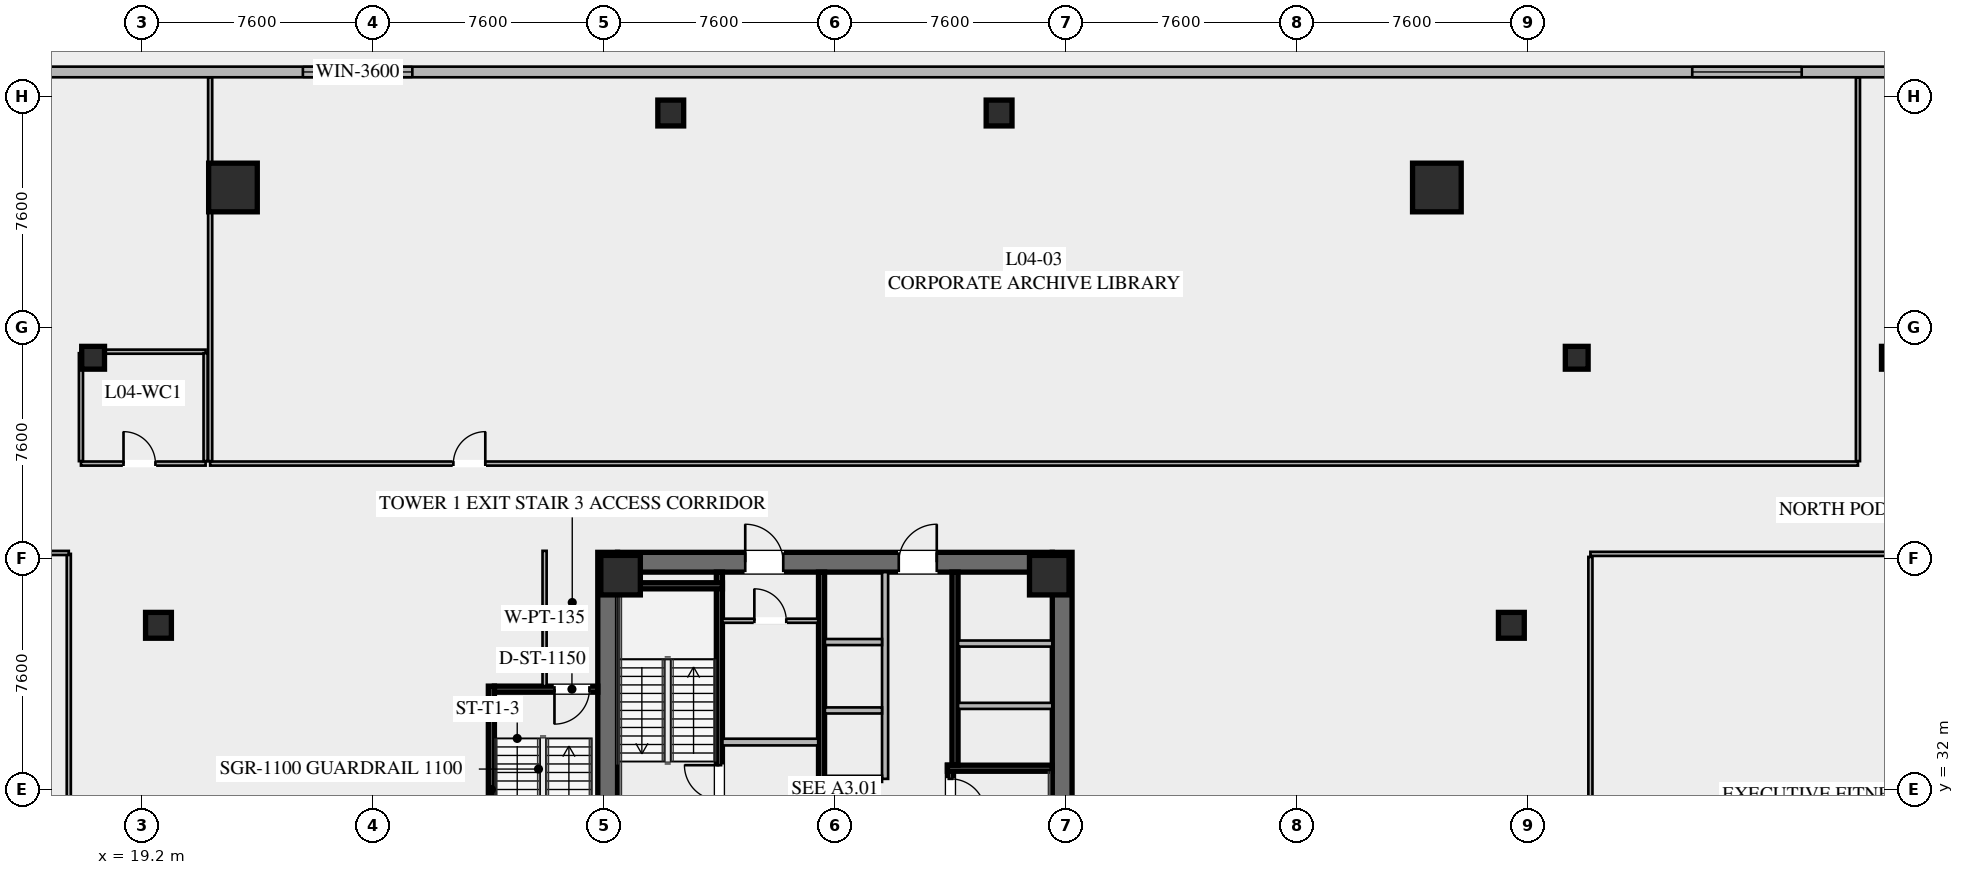
"""IFC4 building model, lengths in metres.
Left out: names, types, materials, properties, quantities, classifications, styles, units other than length and angle.
Written with IfcOpenShell. Run it as: python <this file> out.ifc"""

import sys

from ifc_helpers import new_model, si_unit, direction, frame, frame_2d, origin, origin_2d, place, context, subcontext, project, spatial, rectangle, hollow_rectangle, extrude, element, fill, save


model = new_model("IFC4")
c1 = context("Model", 3, precision=1e-05, world=origin(), true_north=direction((0.0, 1.0)))
c2 = subcontext(c1, "Body", "Model", "MODEL_VIEW")
j1 = project(units=[si_unit("LENGTHUNIT", "METRE"), si_unit("PLANEANGLEUNIT", "RADIAN")], contexts=[c1])
p1 = place(None, origin())
s1 = spatial("IfcSite", under=j1, at=p1, CompositionType="ELEMENT")
p2 = place(p1, origin())
s2 = spatial("IfcBuilding", under=s1, at=p2, CompositionType="ELEMENT")
p3 = place(p2, frame((0.0, 0.0, 19.8)))
s3 = spatial("IfcBuildingStorey", under=s2, at=p3, CompositionType="ELEMENT", Elevation=19.8)
for number, where, z_axis, x_axis in (
    (1, (34.525, 24.2, 0.0), (0.0, 0.0, 1.0), (0.0, 1.0, 0.0)),
    (2, (49.475, 39.8, 0.0), (0.0, 0.0, 1.0), (0.0, -1.0, 0.0)),
):
    element("IfcWall", number, at=place(p3, frame(where, z_axis=z_axis, x_axis=x_axis)), inside=s3, PredefinedType="SHEAR", context=c2, shape_type="SweptSolid", body=[
        extrude(rectangle(XDim=15.6, YDim=0.65, at=frame_2d((7.8, 0.0))), origin(), (0.0, 0.0, 1.0), 4.8),
    ])
p4 = place(p3, frame((34.85, 39.475, 0.0), z_axis=(0.0, 0.0, 1.0), x_axis=(1.0, 0.0, 0.0)))
e3 = element("IfcWall", 3, at=p4, inside=s3, PredefinedType="SHEAR", context=c2, shape_type="SweptSolid", body=[
    extrude(rectangle(XDim=14.3, YDim=0.65, at=frame_2d((7.15, 0.0))), origin(), (0.0, 0.0, 1.0), 4.8),
])
p5 = place(p4, frame((4.2, 0.0, 0.0)))
e4 = element("IfcOpeningElement", 4, at=p5, cuts=e3, PredefinedType="OPENING", context=c2, shape_type="SweptSolid", body=[
    extrude(rectangle(XDim=1.25, YDim=2.25, at=frame_2d((0.625, 1.125))), frame((0.0, 0.335, 0.0), z_axis=(0.0, -1.0, 0.0), x_axis=(1.0, 0.0, 0.0)), (0.0, 0.0, 1.0), 0.67),
])
p6 = place(p4, frame((9.25, 0.0, 0.0)))
e5 = element("IfcOpeningElement", 5, at=p6, cuts=e3, PredefinedType="OPENING", context=c2, shape_type="SweptSolid", body=[
    extrude(rectangle(XDim=1.25, YDim=2.25, at=frame_2d((0.625, 1.125))), frame((0.0, 0.335, 0.0), z_axis=(0.0, -1.0, 0.0), x_axis=(1.0, 0.0, 0.0)), (0.0, 0.0, 1.0), 0.67),
])
for number, where, z_axis, x_axis in (
    (6, (49.05, 39.05, 0.0), (0.0, 0.0, 1.0), (1.0, 0.0, 0.0)),
    (7, (34.95, 39.05, 0.0), (0.0, 0.0, 1.0), (1.0, 0.0, 0.0)),
):
    element("IfcColumn", number, at=place(p3, frame(where, z_axis=z_axis, x_axis=x_axis)), inside=s3, PredefinedType="COLUMN", context=c2, shape_type="SweptSolid", body=[
        extrude(hollow_rectangle(XDim=1.3, YDim=1.3, WallThickness=0.05, at=origin_2d()), origin(), (0.0, 0.0, 1.0), 4.6),
    ])
for number, where, z_axis, x_axis in (
    (8, (61.8, 51.8, 0.0), (0.0, 0.0, 1.0), (1.0, 0.0, 0.0)),
    (9, (22.2, 51.8, 0.0), (0.0, 0.0, 1.0), (1.0, 0.0, 0.0)),
):
    element("IfcColumn", number, at=place(p3, frame(where, z_axis=z_axis, x_axis=x_axis)), inside=s3, PredefinedType="COLUMN", context=c2, shape_type="SweptSolid", body=[
        extrude(hollow_rectangle(XDim=1.6, YDim=1.6, WallThickness=0.06, at=origin_2d()), origin(), (0.0, 0.0, 1.0), 4.6),
    ])
for number, where, z_axis, x_axis in (
    (10, (64.25, 37.4, 0.0), (0.0, 0.0, 1.0), (1.0, 0.0, 0.0)),
    (11, (47.4, 54.25, 0.0), (0.0, 0.0, 1.0), (1.0, 0.0, 0.0)),
    (12, (36.6, 54.25, 0.0), (0.0, 0.0, 1.0), (1.0, 0.0, 0.0)),
    (13, (19.75, 37.4, 0.0), (0.0, 0.0, 1.0), (1.0, 0.0, 0.0)),
):
    element("IfcColumn", number, at=place(p3, frame(where, z_axis=z_axis, x_axis=x_axis)), inside=s3, PredefinedType="COLUMN", context=c2, shape_type="SweptSolid", body=[
        extrude(hollow_rectangle(XDim=0.85, YDim=0.85, WallThickness=0.035, at=origin_2d()), origin(), (0.0, 0.0, 1.0), 4.6),
    ])
for number, where, z_axis, x_axis in (
    (14, (17.6, 46.2, 0.0), (0.0, 0.0, 1.0), (1.0, 0.0, 0.0)),
    (15, (66.4, 46.2, 0.0), (0.0, 0.0, 1.0), (1.0, 0.0, 0.0)),
    (16, (76.8, 46.2, 0.0), (0.0, 0.0, 1.0), (1.0, 0.0, 0.0)),
):
    element("IfcColumn", number, at=place(p3, frame(where, z_axis=z_axis, x_axis=x_axis)), inside=s3, PredefinedType="COLUMN", context=c2, shape_type="SweptSolid", body=[
        extrude(rectangle(XDim=0.75, YDim=0.75, at=origin_2d()), origin(), (0.0, 0.0, 1.0), 4.6),
    ])
p7 = place(p3, frame((11.35, 55.6, 0.0), z_axis=(0.0, 0.0, 1.0), x_axis=(1.0, 0.0, 0.0)))
e17 = element("IfcWall", 17, at=p7, inside=s3, PredefinedType="SOLIDWALL", context=c2, shape_type="SweptSolid", body=[
    extrude(rectangle(XDim=132.475, YDim=0.35, at=frame_2d((66.237, 0.0))), origin(), (0.0, 0.0, 1.0), 4.6),
])
p8 = place(p7, frame((13.15, 0.0, 0.95)))
e18 = element("IfcOpeningElement", 18, at=p8, cuts=e17, PredefinedType="OPENING", context=c2, shape_type="SweptSolid", body=[
    extrude(rectangle(XDim=3.6, YDim=1.8, at=frame_2d((1.8, 0.9))), frame((0.0, 0.185, 0.0), z_axis=(0.0, -1.0, 0.0), x_axis=(1.0, 0.0, 0.0)), (0.0, 0.0, 1.0), 0.37),
])
p9 = place(p7, frame((58.85, 0.0, 0.95)))
e19 = element("IfcOpeningElement", 19, at=p9, cuts=e17, PredefinedType="OPENING", context=c2, shape_type="SweptSolid", body=[
    extrude(rectangle(XDim=3.6, YDim=1.8, at=frame_2d((1.8, 0.9))), frame((0.0, 0.185, 0.0), z_axis=(0.0, -1.0, 0.0), x_axis=(1.0, 0.0, 0.0)), (0.0, 0.0, 1.0), 0.37),
])
p10 = place(p7, frame((68.45, 0.0, 0.95)))
e20 = element("IfcOpeningElement", 20, at=p10, cuts=e17, PredefinedType="OPENING", context=c2, shape_type="SweptSolid", body=[
    extrude(rectangle(XDim=3.6, YDim=1.8, at=frame_2d((1.8, 0.9))), frame((0.0, 0.185, 0.0), z_axis=(0.0, -1.0, 0.0), x_axis=(1.0, 0.0, 0.0)), (0.0, 0.0, 1.0), 0.37),
])
p11 = place(p3, frame((38.2, 31.2, 0.0), z_axis=(0.0, 0.0, 1.0), x_axis=(0.0, 1.0, 0.0)))
e21 = element("IfcWall", 21, at=p11, inside=s3, PredefinedType="SHEAR", context=c2, shape_type="SweptSolid", body=[
    extrude(rectangle(XDim=7.95, YDim=0.2, at=frame_2d((3.975, 0.0))), origin(), (0.0, 0.0, 1.0), 4.6),
])
p12 = place(p11, frame((0.45, 0.0, 0.0)))
e22 = element("IfcOpeningElement", 22, at=p12, cuts=e21, PredefinedType="OPENING", context=c2, shape_type="SweptSolid", body=[
    extrude(rectangle(XDim=1.15, YDim=2.2, at=frame_2d((0.575, 1.1))), frame((0.0, 0.11, 0.0), z_axis=(0.0, -1.0, 0.0), x_axis=(1.0, 0.0, 0.0)), (0.0, 0.0, 1.0), 0.22),
])
p13 = place(p3, frame((34.85, 38.7, 0.0), z_axis=(0.0, 0.0, 1.0), x_axis=(1.0, 0.0, 0.0)))
e23 = element("IfcWall", 23, at=p13, inside=s3, PredefinedType="SHEAR", context=c2, shape_type="SweptSolid", body=[
    extrude(rectangle(XDim=3.45, YDim=0.2, at=frame_2d((1.725, 0.0))), origin(), (0.0, 0.0, 1.0), 4.6),
])
p14 = place(p3, frame((45.8, 32.8, 0.0), z_axis=(0.0, 0.0, 1.0), x_axis=(0.0, -1.0, 0.0)))
e24 = element("IfcWall", 24, at=p14, inside=s3, PredefinedType="SHEAR", context=c2, shape_type="SweptSolid", body=[
    extrude(rectangle(XDim=7.95, YDim=0.2, at=frame_2d((3.975, 0.0))), origin(), (0.0, 0.0, 1.0), 4.6),
])
p15 = place(p14, frame((0.45, 0.0, 0.0)))
e25 = element("IfcOpeningElement", 25, at=p15, cuts=e24, PredefinedType="OPENING", context=c2, shape_type="SweptSolid", body=[
    extrude(rectangle(XDim=1.15, YDim=2.2, at=frame_2d((0.575, 1.1))), frame((0.0, 0.11, 0.0), z_axis=(0.0, -1.0, 0.0), x_axis=(1.0, 0.0, 0.0)), (0.0, 0.0, 1.0), 0.22),
])
p16 = place(p3, frame((45.7, 32.7, 0.0), z_axis=(0.0, 0.0, 1.0), x_axis=(1.0, 0.0, 0.0)))
e26 = element("IfcWall", 26, at=p16, inside=s3, PredefinedType="SHEAR", context=c2, shape_type="SweptSolid", body=[
    extrude(rectangle(XDim=3.45, YDim=0.2, at=frame_2d((1.725, 0.0))), origin(), (0.0, 0.0, 1.0), 4.6),
])
p17 = place(p3, frame((41.56, 24.85, 0.0), z_axis=(0.0, 0.0, 1.0), x_axis=(0.0, 1.0, 0.0)))
e27 = element("IfcWall", 27, at=p17, inside=s3, PredefinedType="SHEAR", context=c2, shape_type="SweptSolid", body=[
    extrude(rectangle(XDim=14.3, YDim=0.2, at=frame_2d((7.15, 0.0))), origin(), (0.0, 0.0, 1.0), 4.6),
])
p18 = place(p3, frame((38.3, 33.56, 0.0), z_axis=(0.0, 0.0, 1.0), x_axis=(1.0, 0.0, 0.0)))
e28 = element("IfcWall", 28, at=p18, inside=s3, PredefinedType="SOLIDWALL", context=c2, shape_type="SweptSolid", body=[
    extrude(rectangle(XDim=3.15, YDim=0.22, at=frame_2d((1.575, 0.0))), origin(), (0.0, 0.0, 1.0), 3.643),
])
p19 = place(p3, frame((45.95, 39.15, 0.0), z_axis=(0.0, 0.0, 1.0), x_axis=(0.0, -1.0, 0.0)))
e29 = element("IfcWall", 29, at=p19, inside=s3, PredefinedType="SHEAR", context=c2, shape_type="SweptSolid", body=[
    extrude(rectangle(XDim=6.35, YDim=0.2, at=frame_2d((3.175, 0.0))), origin(), (0.0, 0.0, 1.0), 4.6),
])
for number, where, z_axis, x_axis in (
    (30, (46.05, 34.75, 0.0), (0.0, 0.0, 1.0), (1.0, 0.0, 0.0)),
    (31, (46.05, 36.8, 0.0), (0.0, 0.0, 1.0), (1.0, 0.0, 0.0)),
):
    element("IfcWall", number, at=place(p3, frame(where, z_axis=z_axis, x_axis=x_axis)), inside=s3, PredefinedType="SOLIDWALL", context=c2, shape_type="SweptSolid", body=[
        extrude(rectangle(XDim=3.1, YDim=0.2, at=frame_2d((1.55, 0.0))), origin(), (0.0, 0.0, 1.0), 4.6),
    ])
p20 = place(p3, frame((38.3, 37.55, 0.0), z_axis=(0.0, 0.0, 1.0), x_axis=(1.0, 0.0, 0.0)))
e32 = element("IfcWall", 32, at=p20, inside=s3, PredefinedType="PARTITIONING", context=c2, shape_type="SweptSolid", body=[
    extrude(rectangle(XDim=3.15, YDim=0.135, at=frame_2d((1.575, 0.0))), origin(), (0.0, 0.0, 1.0), 3.643),
])
p21 = place(p20, frame((1.05, 0.0, 0.0)))
e33 = element("IfcOpeningElement", 33, at=p21, cuts=e32, PredefinedType="OPENING", context=c2, shape_type="SweptSolid", body=[
    extrude(rectangle(XDim=1.05, YDim=2.2, at=frame_2d((0.525, 1.1))), frame((0.0, 0.077, 0.0), z_axis=(0.0, -1.0, 0.0), x_axis=(1.0, 0.0, 0.0)), (0.0, 0.0, 1.0), 0.155),
])
p22 = place(p3, frame((43.65, 32.35, 0.0), z_axis=(0.0, 0.0, 1.0), x_axis=(0.0, 1.0, 0.0)))
e34 = element("IfcWall", 34, at=p22, inside=s3, PredefinedType="SOLIDWALL", context=c2, shape_type="SweptSolid", body=[
    extrude(rectangle(XDim=6.8, YDim=0.2, at=frame_2d((3.4, 0.0))), origin(), (0.0, 0.0, 1.0), 4.6),
])
for number, where, z_axis, x_axis in (
    (35, (41.67, 32.35, 0.0), (0.0, 0.0, 1.0), (1.0, 0.0, 0.0)),
    (36, (41.67, 34.6, 0.0), (0.0, 0.0, 1.0), (1.0, 0.0, 0.0)),
    (37, (41.67, 36.85, 0.0), (0.0, 0.0, 1.0), (1.0, 0.0, 0.0)),
):
    element("IfcWall", number, at=place(p3, frame(where, z_axis=z_axis, x_axis=x_axis)), inside=s3, PredefinedType="SOLIDWALL", context=c2, shape_type="SweptSolid", body=[
        extrude(rectangle(XDim=1.88, YDim=0.2, at=frame_2d((0.94, 0.0))), origin(), (0.0, 0.0, 1.0), 4.6),
    ])
p23 = place(p3, frame((30.7, 28.6, 0.0), z_axis=(0.0, 0.0, 1.0), x_axis=(0.0, 1.0, 0.0)))
e38 = element("IfcWall", 38, at=p23, inside=s3, PredefinedType="SHEAR", context=c2, shape_type="SweptSolid", body=[
    extrude(rectangle(XDim=6.8, YDim=0.2, at=frame_2d((3.4, 0.0))), origin(), (0.0, 0.0, 1.0), 4.6),
])
p24 = place(p3, frame((34.2, 35.3, 0.0), z_axis=(0.0, 0.0, 1.0), x_axis=(-1.0, 0.0, 0.0)))
e39 = element("IfcWall", 39, at=p24, inside=s3, PredefinedType="SHEAR", context=c2, shape_type="SweptSolid", body=[
    extrude(rectangle(XDim=3.4, YDim=0.2, at=frame_2d((1.7, 0.0))), origin(), (0.0, 0.0, 1.0), 4.6),
])
p25 = place(p24, frame((0.275, 0.0, 0.0)))
e40 = element("IfcOpeningElement", 40, at=p25, cuts=e39, PredefinedType="OPENING", context=c2, shape_type="SweptSolid", body=[
    extrude(rectangle(XDim=1.15, YDim=2.2, at=frame_2d((0.575, 1.1))), frame((0.0, 0.11, 0.0), z_axis=(0.0, -1.0, 0.0), x_axis=(1.0, 0.0, 0.0)), (0.0, 0.0, 1.0), 0.22),
])
p26 = place(p3, frame((32.45, 35.4, 0.0), z_axis=(0.0, 0.0, 1.0), x_axis=(0.0, 1.0, 0.0)))
e41 = element("IfcWall", 41, at=p26, inside=s3, PredefinedType="PARTITIONING", context=c2, shape_type="SweptSolid", body=[
    extrude(rectangle(XDim=4.45, YDim=0.135, at=frame_2d((2.225, 0.0))), origin(), (0.0, 0.0, 1.0), 3.643),
])
p27 = place(p3, frame((16.8, 24.35, 0.0), z_axis=(0.0, 0.0, 1.0), x_axis=(0.0, 1.0, 0.0)))
e42 = element("IfcWall", 42, at=p27, inside=s3, PredefinedType="PARTITIONING", context=c2, shape_type="SweptSolid", body=[
    extrude(rectangle(XDim=15.4, YDim=0.135, at=frame_2d((7.7, 0.0))), origin(), (0.0, 0.0, 1.0), 3.643),
])
p28 = place(p3, frame((11.35, 39.78, 0.0), z_axis=(0.0, 0.0, 1.0), x_axis=(1.0, 0.0, 0.0)))
e43 = element("IfcWall", 43, at=p28, inside=s3, PredefinedType="PARTITIONING", context=c2, shape_type="SweptSolid", body=[
    extrude(rectangle(XDim=5.45, YDim=0.135, at=frame_2d((2.725, 0.0))), origin(), (0.0, 0.0, 1.0), 3.643),
])
p29 = place(p3, frame((66.85, 24.35, 0.0), z_axis=(0.0, 0.0, 1.0), x_axis=(0.0, 1.0, 0.0)))
e44 = element("IfcWall", 44, at=p29, inside=s3, PredefinedType="PARTITIONING", context=c2, shape_type="SweptSolid", body=[
    extrude(rectangle(XDim=15.3, YDim=0.135, at=frame_2d((7.65, 0.0))), origin(), (0.0, 0.0, 1.0), 3.643),
])
p30 = place(p3, frame((66.85, 39.75, 0.0), z_axis=(0.0, 0.0, 1.0), x_axis=(1.0, 0.0, 0.0)))
e45 = element("IfcWall", 45, at=p30, inside=s3, PredefinedType="PARTITIONING", context=c2, shape_type="SweptSolid", body=[
    extrude(rectangle(XDim=19.9, YDim=0.135, at=frame_2d((9.95, 0.0))), origin(), (0.0, 0.0, 1.0), 3.643),
])
p31 = place(p3, frame((21.45, 42.72, 0.0), z_axis=(0.0, 0.0, 1.0), x_axis=(1.0, 0.0, 0.0)))
e46 = element("IfcWall", 46, at=p31, inside=s3, PredefinedType="PARTITIONING", context=c2, shape_type="SweptSolid", body=[
    extrude(rectangle(XDim=54.2, YDim=0.135, at=frame_2d((27.1, 0.0))), origin(), (0.0, 0.0, 1.0), 3.643),
])
p32 = place(p31, frame((8.0, 0.0, 0.0)))
e47 = element("IfcOpeningElement", 47, at=p32, cuts=e46, PredefinedType="OPENING", context=c2, shape_type="SweptSolid", body=[
    extrude(rectangle(XDim=1.05, YDim=2.2, at=frame_2d((0.525, 1.1))), frame((0.0, 0.077, 0.0), z_axis=(0.0, -1.0, 0.0), x_axis=(1.0, 0.0, 0.0)), (0.0, 0.0, 1.0), 0.155),
])
for number, where, z_axis, x_axis in (
    (48, (21.45, 42.8, 0.0), (0.0, 0.0, 1.0), (0.0, 1.0, 0.0)),
    (49, (75.65, 42.8, 0.0), (0.0, 0.0, 1.0), (0.0, 1.0, 0.0)),
):
    element("IfcWall", number, at=place(p3, frame(where, z_axis=z_axis, x_axis=x_axis)), inside=s3, PredefinedType="PARTITIONING", context=c2, shape_type="SweptSolid", body=[
        extrude(rectangle(XDim=12.62, YDim=0.135, at=frame_2d((6.31, 0.0))), origin(), (0.0, 0.0, 1.0), 3.643),
    ])
p33 = place(p3, frame((17.2, 42.72, 0.0), z_axis=(0.0, 0.0, 1.0), x_axis=(1.0, 0.0, 0.0)))
e50 = element("IfcWall", 50, at=p33, inside=s3, PredefinedType="PARTITIONING", context=c2, shape_type="SweptSolid", body=[
    extrude(rectangle(XDim=4.1, YDim=0.135, at=frame_2d((2.05, 0.0))), origin(), (0.0, 0.0, 1.0), 3.643),
])
p34 = place(p33, frame((1.4, 0.0, 0.0)))
e51 = element("IfcOpeningElement", 51, at=p34, cuts=e50, PredefinedType="OPENING", context=c2, shape_type="SweptSolid", body=[
    extrude(rectangle(XDim=1.05, YDim=2.2, at=frame_2d((0.525, 1.1))), frame((0.0, 0.077, 0.0), z_axis=(0.0, -1.0, 0.0), x_axis=(1.0, 0.0, 0.0)), (0.0, 0.0, 1.0), 0.155),
])
p35 = place(p3, frame((17.2, 46.4, 0.0), z_axis=(0.0, 0.0, 1.0), x_axis=(1.0, 0.0, 0.0)))
e52 = element("IfcWall", 52, at=p35, inside=s3, PredefinedType="PARTITIONING", context=c2, shape_type="SweptSolid", body=[
    extrude(rectangle(XDim=4.1, YDim=0.135, at=frame_2d((2.05, 0.0))), origin(), (0.0, 0.0, 1.0), 3.643),
])
for number, where, z_axis, x_axis in (
    (53, (17.2, 42.8, 0.0), (0.0, 0.0, 1.0), (0.0, 1.0, 0.0)),
    (54, (21.3, 42.8, 0.0), (0.0, 0.0, 1.0), (0.0, 1.0, 0.0)),
):
    element("IfcWall", number, at=place(p3, frame(where, z_axis=z_axis, x_axis=x_axis)), inside=s3, PredefinedType="PARTITIONING", context=c2, shape_type="SweptSolid", body=[
        extrude(rectangle(XDim=3.55, YDim=0.135, at=frame_2d((1.775, 0.0))), origin(), (0.0, 0.0, 1.0), 3.643),
    ])
p36 = place(p8, origin())
e55 = element("IfcWindow", 55, at=p36, inside=s3, PartitioningType="SINGLE_PANEL", PredefinedType="WINDOW", context=c2, shape_type="SweptSolid", body=[
    extrude(rectangle(XDim=3.6, YDim=1.8, at=frame_2d((1.8, 0.9))), frame((0.0, 0.03, 0.0), z_axis=(0.0, -1.0, 0.0), x_axis=(1.0, 0.0, 0.0)), (0.0, 0.0, 1.0), 0.06),
])
fill(e18, e55)
p37 = place(p9, origin())
e56 = element("IfcWindow", 56, at=p37, inside=s3, PartitioningType="SINGLE_PANEL", PredefinedType="WINDOW", context=c2, shape_type="SweptSolid", body=[
    extrude(rectangle(XDim=3.6, YDim=1.8, at=frame_2d((1.8, 0.9))), frame((0.0, 0.03, 0.0), z_axis=(0.0, -1.0, 0.0), x_axis=(1.0, 0.0, 0.0)), (0.0, 0.0, 1.0), 0.06),
])
fill(e19, e56)
p38 = place(p5, origin())
e57 = element("IfcDoor", 57, at=p38, inside=s3, OperationType="SINGLE_SWING_LEFT", PredefinedType="DOOR", context=c2, shape_type="SweptSolid", body=[
    extrude(rectangle(XDim=1.25, YDim=2.25, at=frame_2d((0.625, 1.125))), frame((0.0, 0.025, 0.0), z_axis=(0.0, -1.0, 0.0), x_axis=(1.0, 0.0, 0.0)), (0.0, 0.0, 1.0), 0.05),
])
fill(e4, e57)
p39 = place(p6, origin())
e58 = element("IfcDoor", 58, at=p39, inside=s3, OperationType="SINGLE_SWING_RIGHT", PredefinedType="DOOR", context=c2, shape_type="SweptSolid", body=[
    extrude(rectangle(XDim=1.25, YDim=2.25, at=frame_2d((0.625, 1.125))), frame((0.0, 0.025, 0.0), z_axis=(0.0, -1.0, 0.0), x_axis=(1.0, 0.0, 0.0)), (0.0, 0.0, 1.0), 0.05),
])
fill(e5, e58)
p40 = place(p12, origin())
e59 = element("IfcDoor", 59, at=p40, inside=s3, OperationType="SINGLE_SWING_RIGHT", PredefinedType="DOOR", context=c2, shape_type="SweptSolid", body=[
    extrude(rectangle(XDim=1.15, YDim=2.2, at=frame_2d((0.575, 1.1))), frame((0.0, 0.025, 0.0), z_axis=(0.0, -1.0, 0.0), x_axis=(1.0, 0.0, 0.0)), (0.0, 0.0, 1.0), 0.05),
])
fill(e22, e59)
p41 = place(p15, origin())
e60 = element("IfcDoor", 60, at=p41, inside=s3, OperationType="SINGLE_SWING_RIGHT", PredefinedType="DOOR", context=c2, shape_type="SweptSolid", body=[
    extrude(rectangle(XDim=1.15, YDim=2.2, at=frame_2d((0.575, 1.1))), frame((0.0, 0.025, 0.0), z_axis=(0.0, -1.0, 0.0), x_axis=(1.0, 0.0, 0.0)), (0.0, 0.0, 1.0), 0.05),
])
fill(e25, e60)
p42 = place(p21, origin())
e61 = element("IfcDoor", 61, at=p42, inside=s3, OperationType="SINGLE_SWING_LEFT", PredefinedType="DOOR", context=c2, shape_type="SweptSolid", body=[
    extrude(rectangle(XDim=1.05, YDim=2.2, at=frame_2d((0.525, 1.1))), frame((0.0, 0.025, 0.0), z_axis=(0.0, -1.0, 0.0), x_axis=(1.0, 0.0, 0.0)), (0.0, 0.0, 1.0), 0.05),
])
fill(e33, e61)
p43 = place(p25, origin())
e62 = element("IfcDoor", 62, at=p43, inside=s3, OperationType="SINGLE_SWING_RIGHT", PredefinedType="DOOR", context=c2, shape_type="SweptSolid", body=[
    extrude(rectangle(XDim=1.15, YDim=2.2, at=frame_2d((0.575, 1.1))), frame((0.0, 0.025, 0.0), z_axis=(0.0, -1.0, 0.0), x_axis=(1.0, 0.0, 0.0)), (0.0, 0.0, 1.0), 0.05),
])
fill(e40, e62)
p44 = place(p32, origin())
e63 = element("IfcDoor", 63, at=p44, inside=s3, OperationType="SINGLE_SWING_RIGHT", PredefinedType="DOOR", context=c2, shape_type="SweptSolid", body=[
    extrude(rectangle(XDim=1.05, YDim=2.2, at=frame_2d((0.525, 1.1))), frame((0.0, 0.025, 0.0), z_axis=(0.0, -1.0, 0.0), x_axis=(1.0, 0.0, 0.0)), (0.0, 0.0, 1.0), 0.05),
])
fill(e47, e63)
p45 = place(p34, origin())
e64 = element("IfcDoor", 64, at=p45, inside=s3, OperationType="SINGLE_SWING_LEFT", PredefinedType="DOOR", context=c2, shape_type="SweptSolid", body=[
    extrude(rectangle(XDim=1.05, YDim=2.2, at=frame_2d((0.525, 1.1))), frame((0.0, 0.025, 0.0), z_axis=(0.0, -1.0, 0.0), x_axis=(1.0, 0.0, 0.0)), (0.0, 0.0, 1.0), 0.05),
])
fill(e51, e64)
save(model, sys.argv[1])
